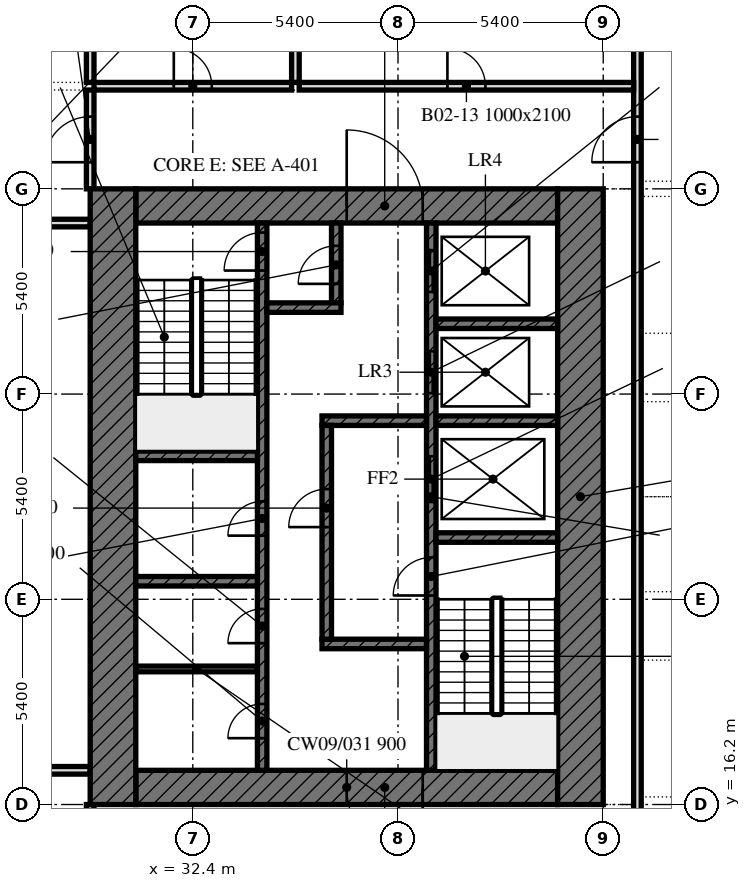
"""IFC4 building model, lengths in metres.
Left out: names, types, materials, properties, quantities, classifications, styles, units other than length and angle.
Written with IfcOpenShell. Run it as: python <this file> out.ifc"""

import sys

from ifc_helpers import new_model, si_unit, direction, frame, frame_2d, origin, place, context, subcontext, project, spatial, rectangle, extrude, element, fill, save


model = new_model("IFC4")
c1 = context("Model", 3, precision=1e-05, world=origin(), true_north=direction((0.0, 1.0)))
c2 = subcontext(c1, "Body", "Model", "MODEL_VIEW")
j1 = project(units=[si_unit("LENGTHUNIT", "METRE"), si_unit("PLANEANGLEUNIT", "RADIAN")], contexts=[c1])
p1 = place(None, origin())
s1 = spatial("IfcSite", under=j1, at=p1, CompositionType="ELEMENT")
p2 = place(p1, origin())
s2 = spatial("IfcBuilding", under=s1, at=p2, CompositionType="ELEMENT")
p3 = place(p2, frame((0.0, 0.0, -9.0)))
s3 = spatial("IfcBuildingStorey", under=s2, at=p3, CompositionType="ELEMENT", Elevation=-9.0)
p4 = place(p3, frame((44.1, 4.4, 0.0), z_axis=(0.0, 0.0, 1.0), x_axis=(0.0, 1.0, 0.0)))
e1 = element("IfcWall", 1, at=p4, inside=s3, PredefinedType="PARTITIONING", context=c2, shape_type="SweptSolid", body=[
    extrude(rectangle(XDim=39.8, YDim=0.2, at=frame_2d((19.9, 0.0))), origin(), (0.0, 0.0, 1.0), 4.1),
])
p5 = place(p4, frame((9.9, 0.0, 0.0)))
e2 = element("IfcOpeningElement", 2, at=p5, cuts=e1, PredefinedType="OPENING", context=c2, shape_type="SweptSolid", body=[
    extrude(rectangle(XDim=1.2, YDim=2.1, at=frame_2d((0.6, 1.05))), frame((0.0, 0.11, 0.0), z_axis=(0.0, -1.0, 0.0), x_axis=(1.0, 0.0, 0.0)), (0.0, 0.0, 1.0), 0.22),
])
p6 = place(p4, frame((28.7, 0.0, 0.0)))
e3 = element("IfcOpeningElement", 3, at=p6, cuts=e1, PredefinedType="OPENING", context=c2, shape_type="SweptSolid", body=[
    extrude(rectangle(XDim=1.2, YDim=2.1, at=frame_2d((0.6, 1.05))), frame((0.0, 0.11, 0.0), z_axis=(0.0, -1.0, 0.0), x_axis=(1.0, 0.0, 0.0)), (0.0, 0.0, 1.0), 0.22),
])
for number, where, z_axis, x_axis in (
    (4, (29.7, 35.2, 0.0), (0.0, 0.0, 1.0), (0.0, 1.0, 0.0)),
    (5, (35.1, 35.2, 0.0), (0.0, 0.0, 1.0), (0.0, 1.0, 0.0)),
):
    element("IfcWall", number, at=place(p3, frame(where, z_axis=z_axis, x_axis=x_axis)), inside=s3, PredefinedType="PARTITIONING", context=c2, shape_type="SweptSolid", body=[
        extrude(rectangle(XDim=8.8, YDim=0.2, at=frame_2d((4.4, 0.0))), origin(), (0.0, 0.0, 1.0), 4.1),
    ])
p7 = place(p3, frame((29.8, 35.1, 0.0), z_axis=(0.0, 0.0, 1.0), x_axis=(1.0, 0.0, 0.0)))
e6 = element("IfcWall", 6, at=p7, inside=s3, PredefinedType="PARTITIONING", context=c2, shape_type="SweptSolid", body=[
    extrude(rectangle(XDim=5.2, YDim=0.2, at=frame_2d((2.6, 0.0))), origin(), (0.0, 0.0, 1.0), 4.1),
])
p8 = place(p7, frame((2.1, 0.0, 0.0)))
e7 = element("IfcOpeningElement", 7, at=p8, cuts=e6, PredefinedType="OPENING", context=c2, shape_type="SweptSolid", body=[
    extrude(rectangle(XDim=1.0, YDim=2.1, at=frame_2d((0.5, 1.05))), frame((0.0, 0.11, 0.0), z_axis=(0.0, -1.0, 0.0), x_axis=(1.0, 0.0, 0.0)), (0.0, 0.0, 1.0), 0.22),
])
p9 = place(p3, frame((35.2, 35.1, 0.0), z_axis=(0.0, 0.0, 1.0), x_axis=(1.0, 0.0, 0.0)))
e8 = element("IfcWall", 8, at=p9, inside=s3, PredefinedType="PARTITIONING", context=c2, shape_type="SweptSolid", body=[
    extrude(rectangle(XDim=8.8, YDim=0.2, at=frame_2d((4.4, 0.0))), origin(), (0.0, 0.0, 1.0), 4.1),
])
p10 = place(p9, frame((3.9, 0.0, 0.0)))
e9 = element("IfcOpeningElement", 9, at=p10, cuts=e8, PredefinedType="OPENING", context=c2, shape_type="SweptSolid", body=[
    extrude(rectangle(XDim=1.0, YDim=2.1, at=frame_2d((0.5, 1.05))), frame((0.0, 0.11, 0.0), z_axis=(0.0, -1.0, 0.0), x_axis=(1.0, 0.0, 0.0)), (0.0, 0.0, 1.0), 0.22),
])
p11 = place(p3, frame((29.7, 13.6, 0.0), z_axis=(0.0, 0.0, 1.0), x_axis=(0.0, 1.0, 0.0)))
e10 = element("IfcWall", 10, at=p11, inside=s3, PredefinedType="PARTITIONING", context=c2, shape_type="SweptSolid", body=[
    extrude(rectangle(XDim=2.6, YDim=0.2, at=frame_2d((1.3, 0.0))), origin(), (0.0, 0.0, 1.0), 4.1),
])
p12 = place(p11, frame((0.7, 0.0, 0.0)))
e11 = element("IfcOpeningElement", 11, at=p12, cuts=e10, PredefinedType="OPENING", context=c2, shape_type="SweptSolid", body=[
    extrude(rectangle(XDim=1.2, YDim=2.1, at=frame_2d((0.6, 1.05))), frame((0.0, 0.11, 0.0), z_axis=(0.0, -1.0, 0.0), x_axis=(1.0, 0.0, 0.0)), (0.0, 0.0, 1.0), 0.22),
])
p13 = place(p3, frame((29.7, 32.4, 0.0), z_axis=(0.0, 0.0, 1.0), x_axis=(0.0, 1.0, 0.0)))
e12 = element("IfcWall", 12, at=p13, inside=s3, PredefinedType="PARTITIONING", context=c2, shape_type="SweptSolid", body=[
    extrude(rectangle(XDim=2.6, YDim=0.2, at=frame_2d((1.3, 0.0))), origin(), (0.0, 0.0, 1.0), 4.1),
])
p14 = place(p13, frame((0.7, 0.0, 0.0)))
e13 = element("IfcOpeningElement", 13, at=p14, cuts=e12, PredefinedType="OPENING", context=c2, shape_type="SweptSolid", body=[
    extrude(rectangle(XDim=1.2, YDim=2.1, at=frame_2d((0.6, 1.05))), frame((0.0, 0.11, 0.0), z_axis=(0.0, -1.0, 0.0), x_axis=(1.0, 0.0, 0.0)), (0.0, 0.0, 1.0), 0.22),
])
p15 = place(p3, frame((18.9, 17.1, 0.0), z_axis=(0.0, 0.0, 1.0), x_axis=(1.0, 0.0, 0.0)))
e14 = element("IfcWall", 14, at=p15, inside=s3, PredefinedType="PARTITIONING", context=c2, shape_type="SweptSolid", body=[
    extrude(rectangle(XDim=10.8, YDim=0.2, at=frame_2d((5.4, 0.0))), origin(), (0.0, 0.0, 1.0), 4.1),
])
p16 = place(p15, frame((4.9, 0.0, 0.0)))
e15 = element("IfcOpeningElement", 15, at=p16, cuts=e14, PredefinedType="OPENING", context=c2, shape_type="SweptSolid", body=[
    extrude(rectangle(XDim=1.0, YDim=2.1, at=frame_2d((0.5, 1.05))), frame((0.0, 0.11, 0.0), z_axis=(0.0, -1.0, 0.0), x_axis=(1.0, 0.0, 0.0)), (0.0, 0.0, 1.0), 0.22),
])
p17 = place(p3, frame((18.9, 31.5, 0.0), z_axis=(0.0, 0.0, 1.0), x_axis=(1.0, 0.0, 0.0)))
e16 = element("IfcWall", 16, at=p17, inside=s3, PredefinedType="PARTITIONING", context=c2, shape_type="SweptSolid", body=[
    extrude(rectangle(XDim=10.8, YDim=0.2, at=frame_2d((5.4, 0.0))), origin(), (0.0, 0.0, 1.0), 4.1),
])
p18 = place(p3, frame((42.0, 16.65, 0.0), z_axis=(0.0, 0.0, 1.0), x_axis=(-1.0, 0.0, 0.0)))
e17 = element("IfcWall", 17, at=p18, inside=s3, PredefinedType="SOLIDWALL", context=c2, shape_type="SweptSolid", body=[
    extrude(rectangle(XDim=11.1, YDim=0.9, at=frame_2d((5.55, 0.0))), origin(), (0.0, 0.0, 1.0), 4.1),
])
p19 = place(p18, frame((3.55, 0.0, 0.0)))
e18 = element("IfcOpeningElement", 18, at=p19, cuts=e17, PredefinedType="OPENING", context=c2, shape_type="SweptSolid", body=[
    extrude(rectangle(XDim=2.0, YDim=2.4, at=frame_2d((1.0, 1.2))), frame((0.0, 0.45, 0.0), z_axis=(0.0, -1.0, 0.0), x_axis=(1.0, 0.0, 0.0)), (0.0, 0.0, 1.0), 0.9),
])
p20 = place(p3, frame((30.9, 31.95, 0.0), z_axis=(0.0, 0.0, 1.0), x_axis=(1.0, 0.0, 0.0)))
e19 = element("IfcWall", 19, at=p20, inside=s3, PredefinedType="SOLIDWALL", context=c2, shape_type="SweptSolid", body=[
    extrude(rectangle(XDim=11.1, YDim=0.9, at=frame_2d((5.55, 0.0))), origin(), (0.0, 0.0, 1.0), 4.1),
])
p21 = place(p20, frame((5.55, 0.0, 0.0)))
e20 = element("IfcOpeningElement", 20, at=p21, cuts=e19, PredefinedType="OPENING", context=c2, shape_type="SweptSolid", body=[
    extrude(rectangle(XDim=2.0, YDim=2.4, at=frame_2d((1.0, 1.2))), frame((0.0, 0.45, 0.0), z_axis=(0.0, -1.0, 0.0), x_axis=(1.0, 0.0, 0.0)), (0.0, 0.0, 1.0), 0.9),
])
for number, where, z_axis, x_axis in (
    (21, (42.6, 32.4, 0.0), (0.0, 0.0, 1.0), (0.0, -1.0, 0.0)),
    (22, (30.3, 16.2, 0.0), (0.0, 0.0, 1.0), (0.0, 1.0, 0.0)),
):
    element("IfcWall", number, at=place(p3, frame(where, z_axis=z_axis, x_axis=x_axis)), inside=s3, PredefinedType="SOLIDWALL", context=c2, shape_type="SweptSolid", body=[
        extrude(rectangle(XDim=16.2, YDim=1.2, at=frame_2d((8.1, 0.0))), origin(), (0.0, 0.0, 1.0), 4.1),
    ])
p22 = place(p3, frame((38.675, 17.1, 0.0), z_axis=(0.0, 0.0, 1.0), x_axis=(0.0, 1.0, 0.0)))
e23 = element("IfcWall", 23, at=p22, inside=s3, PredefinedType="SOLIDWALL", context=c2, shape_type="SweptSolid", body=[
    extrude(rectangle(XDim=14.4, YDim=0.25, at=frame_2d((7.2, 0.0))), origin(), (0.0, 0.0, 1.0), 4.1),
])
p23 = place(p22, frame((4.6, 0.0, 0.0)))
e24 = element("IfcOpeningElement", 24, at=p23, cuts=e23, PredefinedType="OPENING", context=c2, shape_type="SweptSolid", body=[
    extrude(rectangle(XDim=1.0, YDim=2.1, at=frame_2d((0.5, 1.05))), frame((0.0, 0.125, 0.0), z_axis=(0.0, -1.0, 0.0), x_axis=(1.0, 0.0, 0.0)), (0.0, 0.0, 1.0), 0.25),
])
p24 = place(p22, frame((7.062, 0.0, 0.0)))
e25 = element("IfcOpeningElement", 25, at=p24, cuts=e23, PredefinedType="OPENING", context=c2, shape_type="SweptSolid", body=[
    extrude(rectangle(XDim=1.2, YDim=2.1, at=frame_2d((0.6, 1.05))), frame((0.0, 0.125, 0.0), z_axis=(0.0, -1.0, 0.0), x_axis=(1.0, 0.0, 0.0)), (0.0, 0.0, 1.0), 0.25),
])
p25 = place(p22, frame((9.925, 0.0, 0.0)))
e26 = element("IfcOpeningElement", 26, at=p25, cuts=e23, PredefinedType="OPENING", context=c2, shape_type="SweptSolid", body=[
    extrude(rectangle(XDim=1.1, YDim=2.1, at=frame_2d((0.55, 1.05))), frame((0.0, 0.125, 0.0), z_axis=(0.0, -1.0, 0.0), x_axis=(1.0, 0.0, 0.0)), (0.0, 0.0, 1.0), 0.25),
])
p26 = place(p22, frame((12.587, 0.0, 0.0)))
e27 = element("IfcOpeningElement", 27, at=p26, cuts=e23, PredefinedType="OPENING", context=c2, shape_type="SweptSolid", body=[
    extrude(rectangle(XDim=1.1, YDim=2.1, at=frame_2d((0.55, 1.05))), frame((0.0, 0.125, 0.0), z_axis=(0.0, -1.0, 0.0), x_axis=(1.0, 0.0, 0.0)), (0.0, 0.0, 1.0), 0.25),
])
p27 = place(p3, frame((34.225, 17.1, 0.0), z_axis=(0.0, 0.0, 1.0), x_axis=(0.0, 1.0, 0.0)))
e28 = element("IfcWall", 28, at=p27, inside=s3, PredefinedType="SOLIDWALL", context=c2, shape_type="SweptSolid", body=[
    extrude(rectangle(XDim=14.4, YDim=0.25, at=frame_2d((7.2, 0.0))), origin(), (0.0, 0.0, 1.0), 4.1),
])
p28 = place(p27, frame((13.15, 0.0, 0.0)))
e29 = element("IfcOpeningElement", 29, at=p28, cuts=e28, PredefinedType="OPENING", context=c2, shape_type="SweptSolid", body=[
    extrude(rectangle(XDim=1.0, YDim=2.1, at=frame_2d((0.5, 1.05))), frame((0.0, 0.125, 0.0), z_axis=(0.0, -1.0, 0.0), x_axis=(1.0, 0.0, 0.0)), (0.0, 0.0, 1.0), 0.25),
])
p29 = place(p27, frame((0.846, 0.0, 0.0)))
e30 = element("IfcOpeningElement", 30, at=p29, cuts=e28, PredefinedType="OPENING", context=c2, shape_type="SweptSolid", body=[
    extrude(rectangle(XDim=0.9, YDim=2.1, at=frame_2d((0.45, 1.05))), frame((0.0, 0.125, 0.0), z_axis=(0.0, -1.0, 0.0), x_axis=(1.0, 0.0, 0.0)), (0.0, 0.0, 1.0), 0.25),
])
p30 = place(p27, frame((3.346, 0.0, 0.0)))
e31 = element("IfcOpeningElement", 31, at=p30, cuts=e28, PredefinedType="OPENING", context=c2, shape_type="SweptSolid", body=[
    extrude(rectangle(XDim=0.9, YDim=2.1, at=frame_2d((0.45, 1.05))), frame((0.0, 0.125, 0.0), z_axis=(0.0, -1.0, 0.0), x_axis=(1.0, 0.0, 0.0)), (0.0, 0.0, 1.0), 0.25),
])
p31 = place(p27, frame((6.175, 0.0, 0.0)))
e32 = element("IfcOpeningElement", 32, at=p31, cuts=e28, PredefinedType="OPENING", context=c2, shape_type="SweptSolid", body=[
    extrude(rectangle(XDim=0.9, YDim=2.1, at=frame_2d((0.45, 1.05))), frame((0.0, 0.125, 0.0), z_axis=(0.0, -1.0, 0.0), x_axis=(1.0, 0.0, 0.0)), (0.0, 0.0, 1.0), 0.25),
])
p32 = place(p3, frame((38.8, 23.225, 0.0), z_axis=(0.0, 0.0, 1.0), x_axis=(1.0, 0.0, 0.0)))
e33 = element("IfcWall", 33, at=p32, inside=s3, PredefinedType="SOLIDWALL", context=c2, shape_type="SweptSolid", body=[
    extrude(rectangle(XDim=3.2, YDim=0.25, at=frame_2d((1.6, 0.0))), origin(), (0.0, 0.0, 1.0), 4.1),
])
for number, where, z_axis, x_axis in (
    (34, (30.9, 25.375, 0.0), (0.0, 0.0, 1.0), (1.0, 0.0, 0.0)),
    (35, (30.9, 22.075, 0.0), (0.0, 0.0, 1.0), (1.0, 0.0, 0.0)),
):
    element("IfcWall", number, at=place(p3, frame(where, z_axis=z_axis, x_axis=x_axis)), inside=s3, PredefinedType="SOLIDWALL", context=c2, shape_type="SweptSolid", body=[
        extrude(rectangle(XDim=3.2, YDim=0.25, at=frame_2d((1.6, 0.0))), origin(), (0.0, 0.0, 1.0), 4.1),
    ])
p33 = place(p3, frame((38.8, 26.3, 0.0), z_axis=(0.0, 0.0, 1.0), x_axis=(1.0, 0.0, 0.0)))
e36 = element("IfcWall", 36, at=p33, inside=s3, PredefinedType="SOLIDWALL", context=c2, shape_type="SweptSolid", body=[
    extrude(rectangle(XDim=3.2, YDim=0.25, at=frame_2d((1.6, 0.0))), origin(), (0.0, 0.0, 1.0), 4.1),
])
for number, where, z_axis, x_axis in (
    (37, (35.8, 26.3, 0.0), (0.0, 0.0, 1.0), (1.0, 0.0, 0.0)),
    (38, (35.8, 20.425, 0.0), (0.0, 0.0, 1.0), (1.0, 0.0, 0.0)),
):
    element("IfcWall", number, at=place(p3, frame(where, z_axis=z_axis, x_axis=x_axis)), inside=s3, PredefinedType="SOLIDWALL", context=c2, shape_type="SweptSolid", body=[
        extrude(rectangle(XDim=2.75, YDim=0.25, at=frame_2d((1.375, 0.0))), origin(), (0.0, 0.0, 1.0), 4.1),
    ])
p34 = place(p3, frame((36.175, 29.4, 0.0), z_axis=(0.0, 0.0, 1.0), x_axis=(0.0, 1.0, 0.0)))
e39 = element("IfcWall", 39, at=p34, inside=s3, PredefinedType="SOLIDWALL", context=c2, shape_type="SweptSolid", body=[
    extrude(rectangle(XDim=2.1, YDim=0.25, at=frame_2d((1.05, 0.0))), origin(), (0.0, 0.0, 1.0), 4.1),
])
p35 = place(p34, frame((0.5, 0.0, 0.0)))
e40 = element("IfcOpeningElement", 40, at=p35, cuts=e39, PredefinedType="OPENING", context=c2, shape_type="SweptSolid", body=[
    extrude(rectangle(XDim=1.0, YDim=2.1, at=frame_2d((0.5, 1.05))), frame((0.0, 0.125, 0.0), z_axis=(0.0, -1.0, 0.0), x_axis=(1.0, 0.0, 0.0)), (0.0, 0.0, 1.0), 0.25),
])
p36 = place(p3, frame((34.35, 29.275, 0.0), z_axis=(0.0, 0.0, 1.0), x_axis=(1.0, 0.0, 0.0)))
e41 = element("IfcWall", 41, at=p36, inside=s3, PredefinedType="SOLIDWALL", context=c2, shape_type="SweptSolid", body=[
    extrude(rectangle(XDim=1.95, YDim=0.25, at=frame_2d((0.975, 0.0))), origin(), (0.0, 0.0, 1.0), 4.1),
])
p37 = place(p3, frame((35.925, 20.55, 0.0), z_axis=(0.0, 0.0, 1.0), x_axis=(0.0, 1.0, 0.0)))
e42 = element("IfcWall", 42, at=p37, inside=s3, PredefinedType="SOLIDWALL", context=c2, shape_type="SweptSolid", body=[
    extrude(rectangle(XDim=5.625, YDim=0.25, at=frame_2d((2.812, 0.0))), origin(), (0.0, 0.0, 1.0), 4.1),
])
p38 = place(p37, frame((2.95, 0.0, 0.0)))
e43 = element("IfcOpeningElement", 43, at=p38, cuts=e42, PredefinedType="OPENING", context=c2, shape_type="SweptSolid", body=[
    extrude(rectangle(XDim=1.0, YDim=2.1, at=frame_2d((0.5, 1.05))), frame((0.0, 0.125, 0.0), z_axis=(0.0, -1.0, 0.0), x_axis=(1.0, 0.0, 0.0)), (0.0, 0.0, 1.0), 0.25),
])
p39 = place(p3, frame((38.8, 28.85, 0.0), z_axis=(0.0, 0.0, 1.0), x_axis=(1.0, 0.0, 0.0)))
e44 = element("IfcWall", 44, at=p39, inside=s3, PredefinedType="SOLIDWALL", context=c2, shape_type="SweptSolid", body=[
    extrude(rectangle(XDim=3.2, YDim=0.25, at=frame_2d((1.6, 0.0))), origin(), (0.0, 0.0, 1.0), 4.1),
])
p40 = place(p3, frame((30.9, 19.767, 0.0), z_axis=(0.0, 0.0, 1.0), x_axis=(1.0, 0.0, 0.0)))
e45 = element("IfcWall", 45, at=p40, inside=s3, PredefinedType="PARTITIONING", context=c2, shape_type="SweptSolid", body=[
    extrude(rectangle(XDim=3.2, YDim=0.15, at=frame_2d((1.6, 0.0))), origin(), (0.0, 0.0, 1.0), 4.1),
])
p41 = place(p6, origin())
e46 = element("IfcDoor", 46, at=p41, inside=s3, OperationType="SINGLE_SWING_LEFT", PredefinedType="DOOR", context=c2, shape_type="SweptSolid", body=[
    extrude(rectangle(XDim=1.2, YDim=2.1, at=frame_2d((0.6, 1.05))), frame((0.0, 0.025, 0.0), z_axis=(0.0, -1.0, 0.0), x_axis=(1.0, 0.0, 0.0)), (0.0, 0.0, 1.0), 0.05),
])
fill(e3, e46)
p42 = place(p8, origin())
e47 = element("IfcDoor", 47, at=p42, inside=s3, OperationType="SINGLE_SWING_LEFT", PredefinedType="DOOR", context=c2, shape_type="SweptSolid", body=[
    extrude(rectangle(XDim=1.0, YDim=2.1, at=frame_2d((0.5, 1.05))), frame((0.0, 0.025, 0.0), z_axis=(0.0, -1.0, 0.0), x_axis=(1.0, 0.0, 0.0)), (0.0, 0.0, 1.0), 0.05),
])
fill(e7, e47)
p43 = place(p10, origin())
e48 = element("IfcDoor", 48, at=p43, inside=s3, OperationType="SINGLE_SWING_LEFT", PredefinedType="DOOR", context=c2, shape_type="SweptSolid", body=[
    extrude(rectangle(XDim=1.0, YDim=2.1, at=frame_2d((0.5, 1.05))), frame((0.0, 0.025, 0.0), z_axis=(0.0, -1.0, 0.0), x_axis=(1.0, 0.0, 0.0)), (0.0, 0.0, 1.0), 0.05),
])
fill(e9, e48)
p44 = place(p14, origin())
e49 = element("IfcDoor", 49, at=p44, inside=s3, OperationType="SINGLE_SWING_LEFT", PredefinedType="DOOR", context=c2, shape_type="SweptSolid", body=[
    extrude(rectangle(XDim=1.2, YDim=2.1, at=frame_2d((0.6, 1.05))), frame((0.0, 0.025, 0.0), z_axis=(0.0, -1.0, 0.0), x_axis=(1.0, 0.0, 0.0)), (0.0, 0.0, 1.0), 0.05),
])
fill(e13, e49)
p45 = place(p19, origin())
e50 = element("IfcDoor", 50, at=p45, inside=s3, OperationType="DOUBLE_DOOR_SINGLE_SWING", PredefinedType="DOOR", context=c2, shape_type="SweptSolid", body=[
    extrude(rectangle(XDim=2.0, YDim=2.4, at=frame_2d((1.0, 1.2))), frame((0.0, 0.025, 0.0), z_axis=(0.0, -1.0, 0.0), x_axis=(1.0, 0.0, 0.0)), (0.0, 0.0, 1.0), 0.05),
])
fill(e18, e50)
p46 = place(p21, origin())
e51 = element("IfcDoor", 51, at=p46, inside=s3, OperationType="DOUBLE_DOOR_SINGLE_SWING", PredefinedType="DOOR", context=c2, shape_type="SweptSolid", body=[
    extrude(rectangle(XDim=2.0, YDim=2.4, at=frame_2d((1.0, 1.2))), frame((0.0, 0.025, 0.0), z_axis=(0.0, -1.0, 0.0), x_axis=(1.0, 0.0, 0.0)), (0.0, 0.0, 1.0), 0.05),
])
fill(e20, e51)
p47 = place(p23, origin())
e52 = element("IfcDoor", 52, at=p47, inside=s3, OperationType="SINGLE_SWING_LEFT", PredefinedType="DOOR", context=c2, shape_type="SweptSolid", body=[
    extrude(rectangle(XDim=1.0, YDim=2.1, at=frame_2d((0.5, 1.05))), frame((0.0, 0.025, 0.0), z_axis=(0.0, -1.0, 0.0), x_axis=(1.0, 0.0, 0.0)), (0.0, 0.0, 1.0), 0.05),
])
fill(e24, e52)
p48 = place(p38, origin())
e53 = element("IfcDoor", 53, at=p48, inside=s3, OperationType="SINGLE_SWING_LEFT", PredefinedType="DOOR", context=c2, shape_type="SweptSolid", body=[
    extrude(rectangle(XDim=1.0, YDim=2.1, at=frame_2d((0.5, 1.05))), frame((0.0, 0.025, 0.0), z_axis=(0.0, -1.0, 0.0), x_axis=(1.0, 0.0, 0.0)), (0.0, 0.0, 1.0), 0.05),
])
fill(e43, e53)
p49 = place(p28, origin())
e54 = element("IfcDoor", 54, at=p49, inside=s3, OperationType="SINGLE_SWING_LEFT", PredefinedType="DOOR", context=c2, shape_type="SweptSolid", body=[
    extrude(rectangle(XDim=1.0, YDim=2.1, at=frame_2d((0.5, 1.05))), frame((0.0, 0.025, 0.0), z_axis=(0.0, -1.0, 0.0), x_axis=(1.0, 0.0, 0.0)), (0.0, 0.0, 1.0), 0.05),
])
fill(e29, e54)
p50 = place(p35, origin())
e55 = element("IfcDoor", 55, at=p50, inside=s3, OperationType="SINGLE_SWING_LEFT", PredefinedType="DOOR", context=c2, shape_type="SweptSolid", body=[
    extrude(rectangle(XDim=1.0, YDim=2.1, at=frame_2d((0.5, 1.05))), frame((0.0, 0.025, 0.0), z_axis=(0.0, -1.0, 0.0), x_axis=(1.0, 0.0, 0.0)), (0.0, 0.0, 1.0), 0.05),
])
fill(e40, e55)
p51 = place(p24, origin())
e56 = element("IfcDoor", 56, at=p51, inside=s3, OperationType="DOUBLE_DOOR_SLIDING", PredefinedType="DOOR", context=c2, shape_type="SweptSolid", body=[
    extrude(rectangle(XDim=1.2, YDim=2.1, at=frame_2d((0.6, 1.05))), frame((0.0, 0.025, 0.0), z_axis=(0.0, -1.0, 0.0), x_axis=(1.0, 0.0, 0.0)), (0.0, 0.0, 1.0), 0.05),
])
fill(e25, e56)
p52 = place(p25, origin())
e57 = element("IfcDoor", 57, at=p52, inside=s3, OperationType="DOUBLE_DOOR_SLIDING", PredefinedType="DOOR", context=c2, shape_type="SweptSolid", body=[
    extrude(rectangle(XDim=1.1, YDim=2.1, at=frame_2d((0.55, 1.05))), frame((0.0, 0.025, 0.0), z_axis=(0.0, -1.0, 0.0), x_axis=(1.0, 0.0, 0.0)), (0.0, 0.0, 1.0), 0.05),
])
fill(e26, e57)
p53 = place(p26, origin())
e58 = element("IfcDoor", 58, at=p53, inside=s3, OperationType="DOUBLE_DOOR_SLIDING", PredefinedType="DOOR", context=c2, shape_type="SweptSolid", body=[
    extrude(rectangle(XDim=1.1, YDim=2.1, at=frame_2d((0.55, 1.05))), frame((0.0, 0.025, 0.0), z_axis=(0.0, -1.0, 0.0), x_axis=(1.0, 0.0, 0.0)), (0.0, 0.0, 1.0), 0.05),
])
fill(e27, e58)
p54 = place(p29, origin())
e59 = element("IfcDoor", 59, at=p54, inside=s3, OperationType="SINGLE_SWING_LEFT", PredefinedType="DOOR", context=c2, shape_type="SweptSolid", body=[
    extrude(rectangle(XDim=0.9, YDim=2.1, at=frame_2d((0.45, 1.05))), frame((0.0, 0.025, 0.0), z_axis=(0.0, -1.0, 0.0), x_axis=(1.0, 0.0, 0.0)), (0.0, 0.0, 1.0), 0.05),
])
fill(e30, e59)
p55 = place(p30, origin())
e60 = element("IfcDoor", 60, at=p55, inside=s3, OperationType="SINGLE_SWING_LEFT", PredefinedType="DOOR", context=c2, shape_type="SweptSolid", body=[
    extrude(rectangle(XDim=0.9, YDim=2.1, at=frame_2d((0.45, 1.05))), frame((0.0, 0.025, 0.0), z_axis=(0.0, -1.0, 0.0), x_axis=(1.0, 0.0, 0.0)), (0.0, 0.0, 1.0), 0.05),
])
fill(e31, e60)
p56 = place(p31, origin())
e61 = element("IfcDoor", 61, at=p56, inside=s3, OperationType="SINGLE_SWING_LEFT", PredefinedType="DOOR", context=c2, shape_type="SweptSolid", body=[
    extrude(rectangle(XDim=0.9, YDim=2.1, at=frame_2d((0.45, 1.05))), frame((0.0, 0.025, 0.0), z_axis=(0.0, -1.0, 0.0), x_axis=(1.0, 0.0, 0.0)), (0.0, 0.0, 1.0), 0.05),
])
fill(e32, e61)
save(model, sys.argv[1])
